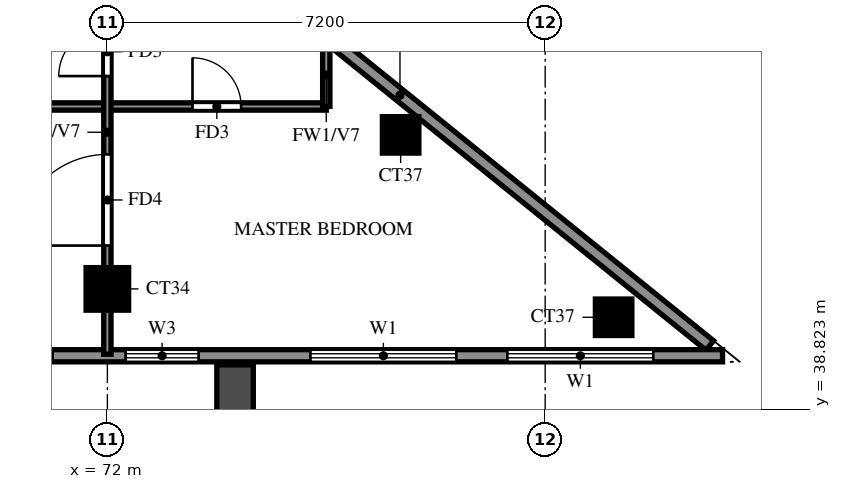
"""IFC4 building model, lengths in metres.
Left out: names, types, materials, properties, quantities, classifications, styles, units other than length and angle.
Written with IfcOpenShell. Run it as: python <this file> out.ifc"""

import sys

from ifc_helpers import new_model, si_unit, direction, frame, frame_2d, origin, origin_2d, place, context, subcontext, project, spatial, rectangle, extrude, source, transform, mapped, element, fill, save


model = new_model("IFC4")
c1 = context("Model", 3, precision=1e-05, world=origin(), true_north=direction((0.0, 1.0)))
c2 = subcontext(c1, "Body", "Model", "MODEL_VIEW")
j1 = project(units=[si_unit("LENGTHUNIT", "METRE"), si_unit("PLANEANGLEUNIT", "RADIAN")], contexts=[c1])
p1 = place(None, origin())
s1 = spatial("IfcSite", under=j1, at=p1, CompositionType="ELEMENT")
p2 = place(p1, origin())
s2 = spatial("IfcBuilding", under=s1, at=p2, CompositionType="ELEMENT")
p3 = place(p2, frame((0.0, 0.0, 264.0)))
s3 = spatial("IfcBuildingStorey", under=s2, at=p3, CompositionType="ELEMENT", Elevation=264.0)
m1 = source(origin(), c2, "Body", "SweptSolid", [
    extrude(rectangle(XDim=0.6, YDim=0.6, at=origin_2d()), origin(), (0.0, 0.0, 1.0), 3.22),
])
p4 = place(p3, frame((80.326, 40.333, 0.0), z_axis=(0.0, 0.0, 1.0), x_axis=(1.0, 0.0, 0.0)))
e1 = element("IfcColumn", 1, at=p4, inside=s3, PredefinedType="COLUMN", context=c2, shape_type="MappedRepresentation", body=[
    mapped(m1, transform((0.0, 0.0, 0.0))),
])
m2 = source(origin(), c2, "Body", "SweptSolid", [
    extrude(rectangle(XDim=0.7, YDim=0.7, at=origin_2d()), origin(), (0.0, 0.0, 1.0), 3.22),
])
p5 = place(p3, frame((72.0, 40.8, 0.0), z_axis=(0.0, 0.0, 1.0), x_axis=(1.0, 0.0, 0.0)))
e2 = element("IfcColumn", 2, at=p5, inside=s3, PredefinedType="COLUMN", context=c2, shape_type="MappedRepresentation", body=[
    mapped(m2, transform((0.0, 0.0, 0.0))),
])
p6 = place(p3, frame((76.823, 43.333, 0.0), z_axis=(0.0, 0.0, 1.0), x_axis=(1.0, 0.0, 0.0)))
e3 = element("IfcColumn", 3, at=p6, inside=s3, PredefinedType="COLUMN", context=c2, shape_type="MappedRepresentation", body=[
    mapped(m1, transform((0.0, 0.0, 0.0))),
])
p7 = place(p3, frame((81.907, 39.87, 0.0), z_axis=(0.0, 0.0, 1.0), x_axis=(-0.777936274417, 0.62834318087, 0.0)))
e4 = element("IfcWall", 4, at=p7, inside=s3, PredefinedType="SOLIDWALL", context=c2, shape_type="SweptSolid", body=[
    extrude(rectangle(XDim=13.099, YDim=0.2, at=frame_2d((6.549, 0.0))), origin(), (0.0, 0.0, 1.0), 3.22),
])
p8 = place(p7, frame((9.938, 0.0, 1.5)))
e5 = element("IfcOpeningElement", 5, at=p8, cuts=e4, PredefinedType="OPENING", context=c2, shape_type="SweptSolid", body=[
    extrude(rectangle(XDim=0.9, YDim=0.9, at=frame_2d((0.45, 0.45))), frame((0.0, 0.11, 0.0), z_axis=(0.0, -1.0, 0.0), x_axis=(1.0, 0.0, 0.0)), (0.0, 0.0, 1.0), 0.22),
])
p9 = place(p3, frame((58.8, 39.7, 0.0), z_axis=(0.0, 0.0, 1.0), x_axis=(1.0, 0.0, 0.0)))
e6 = element("IfcWall", 6, at=p9, inside=s3, PredefinedType="SOLIDWALL", context=c2, shape_type="SweptSolid", body=[
    extrude(rectangle(XDim=23.317, YDim=0.2, at=frame_2d((11.658, 0.0))), origin(), (0.0, 0.0, 1.0), 3.22),
])
p10 = place(p9, frame((10.5, 0.0, 0.0)))
e7 = element("IfcOpeningElement", 7, at=p10, cuts=e6, PredefinedType="OPENING", context=c2, shape_type="SweptSolid", body=[
    extrude(rectangle(XDim=1.8, YDim=2.4, at=frame_2d((0.9, 1.2))), frame((0.0, 0.11, 0.0), z_axis=(0.0, -1.0, 0.0), x_axis=(1.0, 0.0, 0.0)), (0.0, 0.0, 1.0), 0.22),
])
p11 = place(p9, frame((6.3, 0.0, 0.6)))
e8 = element("IfcOpeningElement", 8, at=p11, cuts=e6, PredefinedType="OPENING", context=c2, shape_type="SweptSolid", body=[
    extrude(rectangle(XDim=1.8, YDim=2.4, at=frame_2d((0.9, 1.2))), frame((0.0, 0.11, 0.0), z_axis=(0.0, -1.0, 0.0), x_axis=(1.0, 0.0, 0.0)), (0.0, 0.0, 1.0), 0.22),
])
p12 = place(p9, frame((9.15, 0.0, 0.6)))
e9 = element("IfcOpeningElement", 9, at=p12, cuts=e6, PredefinedType="OPENING", context=c2, shape_type="SweptSolid", body=[
    extrude(rectangle(XDim=0.9, YDim=2.4, at=frame_2d((0.45, 1.2))), frame((0.0, 0.11, 0.0), z_axis=(0.0, -1.0, 0.0), x_axis=(1.0, 0.0, 0.0)), (0.0, 0.0, 1.0), 0.22),
])
p13 = place(p9, frame((13.5, 0.0, 0.6)))
e10 = element("IfcOpeningElement", 10, at=p13, cuts=e6, PredefinedType="OPENING", context=c2, shape_type="SweptSolid", body=[
    extrude(rectangle(XDim=1.2, YDim=2.4, at=frame_2d((0.6, 1.2))), frame((0.0, 0.11, 0.0), z_axis=(0.0, -1.0, 0.0), x_axis=(1.0, 0.0, 0.0)), (0.0, 0.0, 1.0), 0.22),
])
p14 = place(p9, frame((16.539, 0.0, 0.6)))
e11 = element("IfcOpeningElement", 11, at=p14, cuts=e6, PredefinedType="OPENING", context=c2, shape_type="SweptSolid", body=[
    extrude(rectangle(XDim=2.4, YDim=2.4, at=frame_2d((1.2, 1.2))), frame((0.0, 0.11, 0.0), z_axis=(0.0, -1.0, 0.0), x_axis=(1.0, 0.0, 0.0)), (0.0, 0.0, 1.0), 0.22),
])
p15 = place(p9, frame((19.778, 0.0, 0.6)))
e12 = element("IfcOpeningElement", 12, at=p15, cuts=e6, PredefinedType="OPENING", context=c2, shape_type="SweptSolid", body=[
    extrude(rectangle(XDim=2.4, YDim=2.4, at=frame_2d((1.2, 1.2))), frame((0.0, 0.11, 0.0), z_axis=(0.0, -1.0, 0.0), x_axis=(1.0, 0.0, 0.0)), (0.0, 0.0, 1.0), 0.22),
])
p16 = place(p3, frame((74.1, 39.55, 0.0), z_axis=(0.0, 0.0, 1.0), x_axis=(0.0, -1.0, 0.0)))
e13 = element("IfcWall", 13, at=p16, inside=s3, PredefinedType="SOLIDWALL", context=c2, shape_type="SweptSolid", body=[
    extrude(rectangle(XDim=2.65, YDim=0.6, at=frame_2d((1.325, 0.0))), origin(), (0.0, 0.0, 1.0), 2.85),
])
p17 = place(p3, frame((60.0, 43.8, 0.0), z_axis=(0.0, 0.0, 1.0), x_axis=(1.0, 0.0, 0.0)))
e14 = element("IfcWall", 14, at=p17, inside=s3, PredefinedType="PARTITIONING", context=c2, shape_type="SweptSolid", body=[
    extrude(rectangle(XDim=15.6, YDim=0.12, at=frame_2d((7.8, 0.0))), origin(), (0.0, 0.0, 1.0), 3.22),
])
p18 = place(p17, frame((7.65, 0.0, 0.0)))
e15 = element("IfcOpeningElement", 15, at=p18, cuts=e14, PredefinedType="OPENING", context=c2, shape_type="SweptSolid", body=[
    extrude(rectangle(XDim=1.5, YDim=2.1, at=frame_2d((0.75, 1.05))), frame((0.0, 0.07, 0.0), z_axis=(0.0, -1.0, 0.0), x_axis=(1.0, 0.0, 0.0)), (0.0, 0.0, 1.0), 0.14),
])
p19 = place(p17, frame((1.95, 0.0, 0.0)))
e16 = element("IfcOpeningElement", 16, at=p19, cuts=e14, PredefinedType="OPENING", context=c2, shape_type="SweptSolid", body=[
    extrude(rectangle(XDim=0.9, YDim=2.1, at=frame_2d((0.45, 1.05))), frame((0.0, 0.07, 0.0), z_axis=(0.0, -1.0, 0.0), x_axis=(1.0, 0.0, 0.0)), (0.0, 0.0, 1.0), 0.14),
])
p20 = place(p17, frame((13.4, 0.0, 0.0)))
e17 = element("IfcOpeningElement", 17, at=p20, cuts=e14, PredefinedType="OPENING", context=c2, shape_type="SweptSolid", body=[
    extrude(rectangle(XDim=0.8, YDim=2.1, at=frame_2d((0.4, 1.05))), frame((0.0, 0.07, 0.0), z_axis=(0.0, -1.0, 0.0), x_axis=(1.0, 0.0, 0.0)), (0.0, 0.0, 1.0), 0.14),
])
p21 = place(p3, frame((72.0, 39.725, 0.0), z_axis=(0.0, 0.0, 1.0), x_axis=(0.0, 1.0, 0.0)))
e18 = element("IfcWall", 18, at=p21, inside=s3, PredefinedType="PARTITIONING", context=c2, shape_type="SweptSolid", body=[
    extrude(rectangle(XDim=8.114, YDim=0.12, at=frame_2d((4.057, 0.0))), origin(), (0.0, 0.0, 1.0), 2.32),
])
p22 = place(p21, frame((1.788, 0.0, 0.0)))
e19 = element("IfcOpeningElement", 19, at=p22, cuts=e18, PredefinedType="OPENING", context=c2, shape_type="SweptSolid", body=[
    extrude(rectangle(XDim=1.5, YDim=2.1, at=frame_2d((0.75, 1.05))), frame((0.0, 0.07, 0.0), z_axis=(0.0, -1.0, 0.0), x_axis=(1.0, 0.0, 0.0)), (0.0, 0.0, 1.0), 0.14),
])
p23 = place(p21, frame((4.575, 0.0, 0.0)))
e20 = element("IfcOpeningElement", 20, at=p23, cuts=e18, PredefinedType="OPENING", context=c2, shape_type="SweptSolid", body=[
    extrude(rectangle(XDim=0.8, YDim=2.1, at=frame_2d((0.4, 1.05))), frame((0.0, 0.07, 0.0), z_axis=(0.0, -1.0, 0.0), x_axis=(1.0, 0.0, 0.0)), (0.0, 0.0, 1.0), 0.14),
])
p24 = place(p3, frame((75.6, 43.8, 0.0), z_axis=(0.0, 0.0, 1.0), x_axis=(0.0, 1.0, 0.0)))
e21 = element("IfcWall", 21, at=p24, inside=s3, PredefinedType="PARTITIONING", context=c2, shape_type="SweptSolid", body=[
    extrude(rectangle(XDim=1.035, YDim=0.12, at=frame_2d((0.518, 0.0))), origin(), (0.0, 0.0, 1.0), 2.32),
])
p25 = place(p13, origin())
e22 = element("IfcWindow", 22, at=p25, inside=s3, PartitioningType="SINGLE_PANEL", PredefinedType="WINDOW", context=c2, shape_type="SweptSolid", body=[
    extrude(rectangle(XDim=1.2, YDim=2.4, at=frame_2d((0.6, 1.2))), frame((0.0, 0.03, 0.0), z_axis=(0.0, -1.0, 0.0), x_axis=(1.0, 0.0, 0.0)), (0.0, 0.0, 1.0), 0.06),
])
fill(e10, e22)
p26 = place(p14, origin())
e23 = element("IfcWindow", 23, at=p26, inside=s3, PartitioningType="DOUBLE_PANEL_VERTICAL", PredefinedType="WINDOW", context=c2, shape_type="SweptSolid", body=[
    extrude(rectangle(XDim=2.4, YDim=2.4, at=frame_2d((1.2, 1.2))), frame((0.0, 0.03, 0.0), z_axis=(0.0, -1.0, 0.0), x_axis=(1.0, 0.0, 0.0)), (0.0, 0.0, 1.0), 0.06),
])
fill(e11, e23)
p27 = place(p15, origin())
e24 = element("IfcWindow", 24, at=p27, inside=s3, PartitioningType="DOUBLE_PANEL_VERTICAL", PredefinedType="WINDOW", context=c2, shape_type="SweptSolid", body=[
    extrude(rectangle(XDim=2.4, YDim=2.4, at=frame_2d((1.2, 1.2))), frame((0.0, 0.03, 0.0), z_axis=(0.0, -1.0, 0.0), x_axis=(1.0, 0.0, 0.0)), (0.0, 0.0, 1.0), 0.06),
])
fill(e12, e24)
p28 = place(p22, origin())
e25 = element("IfcDoor", 25, at=p28, inside=s3, OperationType="SINGLE_SWING_RIGHT", PredefinedType="DOOR", context=c2, shape_type="SweptSolid", body=[
    extrude(rectangle(XDim=1.5, YDim=2.1, at=frame_2d((0.75, 1.05))), frame((0.0, 0.025, 0.0), z_axis=(0.0, -1.0, 0.0), x_axis=(1.0, 0.0, 0.0)), (0.0, 0.0, 1.0), 0.05),
])
fill(e19, e25)
p29 = place(p23, origin())
e26 = element("IfcDoor", 26, at=p29, inside=s3, OperationType="SINGLE_SWING_RIGHT", PredefinedType="DOOR", context=c2, shape_type="SweptSolid", body=[
    extrude(rectangle(XDim=0.8, YDim=2.1, at=frame_2d((0.4, 1.05))), frame((0.0, 0.025, 0.0), z_axis=(0.0, -1.0, 0.0), x_axis=(1.0, 0.0, 0.0)), (0.0, 0.0, 1.0), 0.05),
])
fill(e20, e26)
p30 = place(p20, origin())
e27 = element("IfcDoor", 27, at=p30, inside=s3, OperationType="SINGLE_SWING_LEFT", PredefinedType="DOOR", context=c2, shape_type="SweptSolid", body=[
    extrude(rectangle(XDim=0.8, YDim=2.1, at=frame_2d((0.4, 1.05))), frame((0.0, 0.025, 0.0), z_axis=(0.0, -1.0, 0.0), x_axis=(1.0, 0.0, 0.0)), (0.0, 0.0, 1.0), 0.05),
])
fill(e17, e27)
save(model, sys.argv[1])
